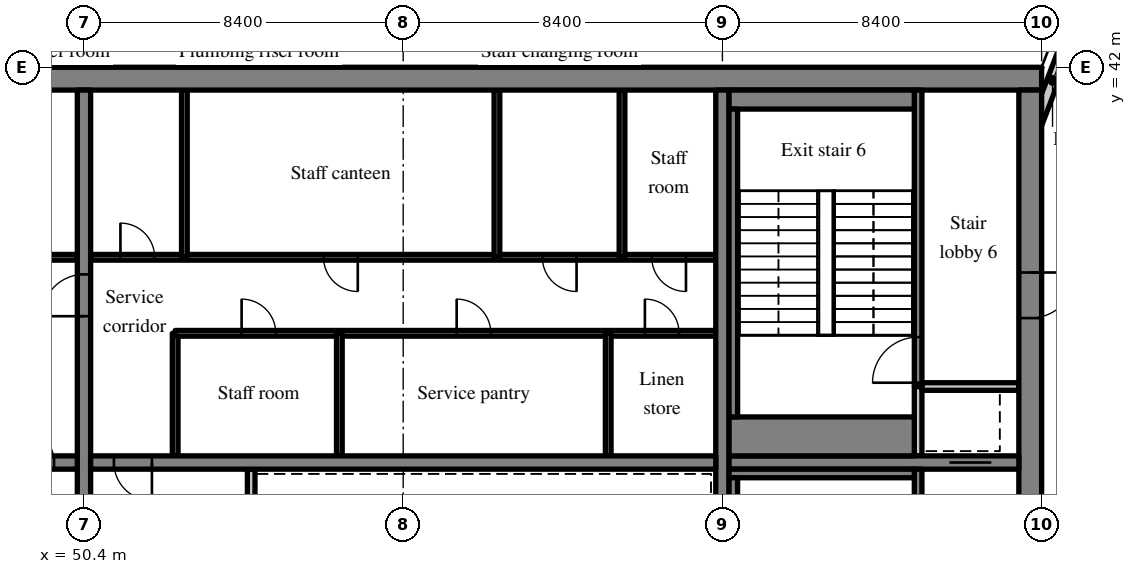
"""IFC4 building model, lengths in metres.
Left out: names, types, materials, properties, quantities, classifications, styles, units other than length and angle.
Written with IfcOpenShell. Run it as: python <this file> out.ifc"""

import sys

from ifc_helpers import new_model, si_unit, direction, frame, frame_2d, origin, place, context, subcontext, project, spatial, rectangle, extrude, source, transform, mapped, element, fill, save


model = new_model("IFC4")
c1 = context("Model", 3, precision=1e-05, world=origin(), true_north=direction((0.0, 1.0)))
c2 = subcontext(c1, "Body", "Model", "MODEL_VIEW")
j1 = project(units=[si_unit("LENGTHUNIT", "METRE"), si_unit("PLANEANGLEUNIT", "RADIAN")], contexts=[c1])
p1 = place(None, origin())
s1 = spatial("IfcSite", under=j1, at=p1, CompositionType="ELEMENT")
p2 = place(p1, origin())
s2 = spatial("IfcBuilding", under=s1, at=p2, CompositionType="ELEMENT")
p3 = place(p2, frame((0.0, 0.0, 214.0)))
s3 = spatial("IfcBuildingStorey", under=s2, at=p3, CompositionType="ELEMENT", Elevation=214.0)
m1 = source(origin(), c2, "Body", "SweptSolid", [
    extrude(rectangle(XDim=50.4, YDim=0.6, at=frame_2d((25.2, 0.0))), origin(), (0.0, 0.0, 1.0), 3.62),
])
p4 = place(p3, frame((25.2, 41.7, 0.0), z_axis=(0.0, 0.0, 1.0), x_axis=(1.0, 0.0, 0.0)))
e1 = element("IfcWall", 1, at=p4, inside=s3, PredefinedType="SHEAR", context=c2, shape_type="MappedRepresentation", body=[
    mapped(m1, transform((0.0, 0.0, 0.0), scale=1.0)),
])
m2 = source(origin(), c2, "Body", "SweptSolid", [
    extrude(rectangle(XDim=18.8, YDim=0.6, at=frame_2d((9.4, 0.0))), origin(), (0.0, 0.0, 1.0), 3.62),
])
p5 = place(p3, frame((75.3, 22.6, 0.0), z_axis=(0.0, 0.0, 1.0), x_axis=(0.0, 1.0, 0.0)))
e2 = element("IfcWall", 2, at=p5, inside=s3, PredefinedType="SHEAR", context=c2, shape_type="MappedRepresentation", body=[
    mapped(m2, transform((0.0, 0.0, 0.0), scale=1.0)),
])
m3 = source(origin(), c2, "Body", "SweptSolid", [
    extrude(rectangle(XDim=1.2, YDim=2.1, at=frame_2d((0.6, 1.05))), frame((0.0, 0.31, 0.0), z_axis=(0.0, -1.0, 0.0), x_axis=(1.0, 0.0, 0.0)), (0.0, 0.0, 1.0), 0.62),
])
p6 = place(p5, frame((12.8, 0.0, 0.0)))
e3 = element("IfcOpeningElement", 3, at=p6, cuts=e2, PredefinedType="OPENING", context=c2, shape_type="MappedRepresentation", body=[
    mapped(m3, transform((0.0, 0.0, 0.0), scale=1.0)),
])
m4 = source(origin(), c2, "Body", "SweptSolid", [
    extrude(rectangle(XDim=18.8, YDim=0.35, at=frame_2d((9.4, 0.0))), origin(), (0.0, 0.0, 1.0), 3.62),
])
p7 = place(p3, frame((50.4, 22.6, 0.0), z_axis=(0.0, 0.0, 1.0), x_axis=(0.0, 1.0, 0.0)))
e4 = element("IfcWall", 4, at=p7, inside=s3, PredefinedType="SHEAR", context=c2, shape_type="MappedRepresentation", body=[
    mapped(m4, transform((0.0, 0.0, 0.0), scale=1.0)),
])
m5 = source(origin(), c2, "Body", "SweptSolid", [
    extrude(rectangle(XDim=1.1, YDim=2.1, at=frame_2d((0.55, 1.05))), frame((0.0, 0.185, 0.0), z_axis=(0.0, -1.0, 0.0), x_axis=(1.0, 0.0, 0.0)), (0.0, 0.0, 1.0), 0.37),
])
p8 = place(p7, frame((12.85, 0.0, 0.0)))
e5 = element("IfcOpeningElement", 5, at=p8, cuts=e4, PredefinedType="OPENING", context=c2, shape_type="MappedRepresentation", body=[
    mapped(m5, transform((0.0, 0.0, 0.0), scale=1.0)),
])
p9 = place(p3, frame((67.2, 22.6, 0.0), z_axis=(0.0, 0.0, 1.0), x_axis=(0.0, 1.0, 0.0)))
e6 = element("IfcWall", 6, at=p9, inside=s3, PredefinedType="SHEAR", context=c2, shape_type="MappedRepresentation", body=[
    mapped(m4, transform((0.0, 0.0, 0.0), scale=1.0)),
])
m6 = source(origin(), c2, "Body", "SweptSolid", [
    extrude(rectangle(XDim=16.45, YDim=0.35, at=frame_2d((8.225, 0.0))), origin(), (0.0, 0.0, 1.0), 3.62),
])
p10 = place(p3, frame((33.775, 31.6, 0.0), z_axis=(0.0, 0.0, 1.0), x_axis=(1.0, 0.0, 0.0)))
e7 = element("IfcWall", 7, at=p10, inside=s3, PredefinedType="SHEAR", context=c2, shape_type="MappedRepresentation", body=[
    mapped(m6, transform((0.0, 0.0, 0.0), scale=1.0)),
])
m7 = source(origin(), c2, "Body", "SweptSolid", [
    extrude(rectangle(XDim=1.0, YDim=2.1, at=frame_2d((0.5, 1.05))), frame((0.0, 0.185, 0.0), z_axis=(0.0, -1.0, 0.0), x_axis=(1.0, 0.0, 0.0)), (0.0, 0.0, 1.0), 0.37),
])
p11 = place(p10, frame((14.837, 0.0, 0.0)))
e8 = element("IfcOpeningElement", 8, at=p11, cuts=e7, PredefinedType="OPENING", context=c2, shape_type="MappedRepresentation", body=[
    mapped(m7, transform((0.0, 0.0, 0.0), scale=1.0)),
])
m8 = source(origin(), c2, "Body", "SweptSolid", [
    extrude(rectangle(XDim=16.45, YDim=0.35, at=frame_2d((8.225, 0.0))), origin(), (0.0, 0.0, 1.0), 3.62),
])
p12 = place(p3, frame((50.575, 31.6, 0.0), z_axis=(0.0, 0.0, 1.0), x_axis=(1.0, 0.0, 0.0)))
e9 = element("IfcWall", 9, at=p12, inside=s3, PredefinedType="SHEAR", context=c2, shape_type="MappedRepresentation", body=[
    mapped(m8, transform((0.0, 0.0, 0.0), scale=1.0)),
])
p13 = place(p12, frame((0.613, 0.0, 0.0)))
e10 = element("IfcOpeningElement", 10, at=p13, cuts=e9, PredefinedType="OPENING", context=c2, shape_type="MappedRepresentation", body=[
    mapped(m7, transform((0.0, 0.0, 0.0), scale=1.0)),
])
m9 = source(origin(), c2, "Body", "SweptSolid", [
    extrude(rectangle(XDim=7.625, YDim=0.35, at=frame_2d((3.812, 0.0))), origin(), (0.0, 0.0, 1.0), 3.62),
])
p14 = place(p3, frame((67.375, 31.6, 0.0), z_axis=(0.0, 0.0, 1.0), x_axis=(1.0, 0.0, 0.0)))
e11 = element("IfcWall", 11, at=p14, inside=s3, PredefinedType="SHEAR", context=c2, shape_type="MappedRepresentation", body=[
    mapped(m9, transform((0.0, 0.0, 0.0), scale=1.0)),
])
p15 = place(p14, frame((5.8, 0.0, 0.0)))
e12 = element("IfcOpeningElement", 12, at=p15, cuts=e11, PredefinedType="OPENING", context=c2, shape_type="MappedRepresentation", body=[
    mapped(m5, transform((0.0, 0.0, 0.0), scale=1.0)),
])
m10 = source(origin(), c2, "Body", "SweptSolid", [
    extrude(rectangle(XDim=3.559, YDim=0.3, at=frame_2d((1.78, 0.0))), origin(), (0.0, 0.0, 1.0), 3.62),
])
p16 = place(p3, frame((76.523, 43.292, 0.0), z_axis=(0.0, 0.0, 1.0), x_axis=(-0.35779745313, -0.933799219604, 0.0)))
e13 = element("IfcWall", 13, at=p16, inside=s3, PredefinedType="SOLIDWALL", context=c2, shape_type="MappedRepresentation", body=[
    mapped(m10, transform((0.0, 0.0, 0.0), scale=1.0)),
])
m11 = source(origin(), c2, "Body", "SweptSolid", [
    extrude(rectangle(XDim=1.5, YDim=2.0, at=frame_2d((0.75, 1.0))), frame((0.0, 0.16, 0.0), z_axis=(0.0, -1.0, 0.0), x_axis=(1.0, 0.0, 0.0)), (0.0, 0.0, 1.0), 0.32),
])
p17 = place(p16, frame((0.156, 0.0, 0.9)))
e14 = element("IfcOpeningElement", 14, at=p17, cuts=e13, PredefinedType="OPENING", context=c2, shape_type="MappedRepresentation", body=[
    mapped(m11, transform((0.0, 0.0, 0.0), scale=1.0)),
])
m12 = source(origin(), c2, "Body", "SweptSolid", [
    extrude(rectangle(XDim=16.45, YDim=0.15, at=frame_2d((8.225, 0.0))), origin(), (0.0, 0.0, 1.0), 3.62),
])
p18 = place(p3, frame((33.775, 37.0, 0.0), z_axis=(0.0, 0.0, 1.0), x_axis=(1.0, 0.0, 0.0)))
e15 = element("IfcWall", 15, at=p18, inside=s3, PredefinedType="PARTITIONING", context=c2, shape_type="MappedRepresentation", body=[
    mapped(m12, transform((0.0, 0.0, 0.0), scale=1.0)),
])
m13 = source(origin(), c2, "Body", "SweptSolid", [
    extrude(rectangle(XDim=0.9, YDim=2.1, at=frame_2d((0.45, 1.05))), frame((0.0, 0.085, 0.0), z_axis=(0.0, -1.0, 0.0), x_axis=(1.0, 0.0, 0.0)), (0.0, 0.0, 1.0), 0.17),
])
p19 = place(p18, frame((3.251, 0.0, 0.0)))
e16 = element("IfcOpeningElement", 16, at=p19, cuts=e15, PredefinedType="OPENING", context=c2, shape_type="MappedRepresentation", body=[
    mapped(m13, transform((0.0, 0.0, 0.0), scale=1.0)),
])
p20 = place(p18, frame((8.186, 0.0, 0.0)))
e17 = element("IfcOpeningElement", 17, at=p20, cuts=e15, PredefinedType="OPENING", context=c2, shape_type="MappedRepresentation", body=[
    mapped(m13, transform((0.0, 0.0, 0.0), scale=1.0)),
])
p21 = place(p18, frame((11.476, 0.0, 0.0)))
e18 = element("IfcOpeningElement", 18, at=p21, cuts=e15, PredefinedType="OPENING", context=c2, shape_type="MappedRepresentation", body=[
    mapped(m13, transform((0.0, 0.0, 0.0), scale=1.0)),
])
p22 = place(p18, frame((14.766, 0.0, 0.0)))
e19 = element("IfcOpeningElement", 19, at=p22, cuts=e15, PredefinedType="OPENING", context=c2, shape_type="MappedRepresentation", body=[
    mapped(m13, transform((0.0, 0.0, 0.0), scale=1.0)),
])
m14 = source(origin(), c2, "Body", "SweptSolid", [
    extrude(rectangle(XDim=2.625, YDim=0.2, at=frame_2d((1.312, 0.0))), origin(), (0.0, 0.0, 1.0), 3.62),
])
p23 = place(p3, frame((54.8, 28.8, 0.0), z_axis=(0.0, 0.0, 1.0), x_axis=(0.0, 1.0, 0.0)))
e20 = element("IfcWall", 20, at=p23, inside=s3, PredefinedType="SOLIDWALL", context=c2, shape_type="MappedRepresentation", body=[
    mapped(m14, transform((0.0, 0.0, 0.0), scale=1.0)),
])
m15 = source(origin(), c2, "Body", "SweptSolid", [
    extrude(rectangle(XDim=3.225, YDim=0.15, at=frame_2d((1.613, 0.0))), origin(), (0.0, 0.0, 1.0), 3.62),
])
p24 = place(p3, frame((52.8, 31.775, 0.0), z_axis=(0.0, 0.0, 1.0), x_axis=(0.0, 1.0, 0.0)))
e21 = element("IfcWall", 21, at=p24, inside=s3, PredefinedType="PARTITIONING", context=c2, shape_type="MappedRepresentation", body=[
    mapped(m15, transform((0.0, 0.0, 0.0), scale=1.0)),
])
m16 = source(origin(), c2, "Body", "SweptSolid", [
    extrude(rectangle(XDim=14.225, YDim=0.15, at=frame_2d((7.112, 0.0))), origin(), (0.0, 0.0, 1.0), 3.62),
])
p25 = place(p3, frame((67.025, 35.0, 0.0), z_axis=(0.0, 0.0, 1.0), x_axis=(-1.0, 0.0, 0.0)))
e22 = element("IfcWall", 22, at=p25, inside=s3, PredefinedType="PARTITIONING", context=c2, shape_type="MappedRepresentation", body=[
    mapped(m16, transform((0.0, 0.0, 0.0), scale=1.0)),
])
p26 = place(p25, frame((0.965, 0.0, 0.0)))
e23 = element("IfcOpeningElement", 23, at=p26, cuts=e22, PredefinedType="OPENING", context=c2, shape_type="MappedRepresentation", body=[
    mapped(m13, transform((0.0, 0.0, 0.0), scale=1.0)),
])
p27 = place(p25, frame((5.918, 0.0, 0.0)))
e24 = element("IfcOpeningElement", 24, at=p27, cuts=e22, PredefinedType="OPENING", context=c2, shape_type="MappedRepresentation", body=[
    mapped(m13, transform((0.0, 0.0, 0.0), scale=1.0)),
])
p28 = place(p25, frame((11.577, 0.0, 0.0)))
e25 = element("IfcOpeningElement", 25, at=p28, cuts=e22, PredefinedType="OPENING", context=c2, shape_type="MappedRepresentation", body=[
    mapped(m13, transform((0.0, 0.0, 0.0), scale=1.0)),
])
m17 = source(origin(), c2, "Body", "SweptSolid", [
    extrude(rectangle(XDim=16.45, YDim=0.15, at=frame_2d((8.225, 0.0))), origin(), (0.0, 0.0, 1.0), 3.62),
])
p29 = place(p3, frame((67.025, 37.0, 0.0), z_axis=(0.0, 0.0, 1.0), x_axis=(-1.0, 0.0, 0.0)))
e26 = element("IfcWall", 26, at=p29, inside=s3, PredefinedType="PARTITIONING", context=c2, shape_type="MappedRepresentation", body=[
    mapped(m17, transform((0.0, 0.0, 0.0), scale=1.0)),
])
p30 = place(p29, frame((0.784, 0.0, 0.0)))
e27 = element("IfcOpeningElement", 27, at=p30, cuts=e26, PredefinedType="OPENING", context=c2, shape_type="MappedRepresentation", body=[
    mapped(m13, transform((0.0, 0.0, 0.0), scale=1.0)),
])
p31 = place(p29, frame((3.663, 0.0, 0.0)))
e28 = element("IfcOpeningElement", 28, at=p31, cuts=e26, PredefinedType="OPENING", context=c2, shape_type="MappedRepresentation", body=[
    mapped(m13, transform((0.0, 0.0, 0.0), scale=1.0)),
])
p32 = place(p29, frame((9.42, 0.0, 0.0)))
e29 = element("IfcOpeningElement", 29, at=p32, cuts=e26, PredefinedType="OPENING", context=c2, shape_type="MappedRepresentation", body=[
    mapped(m13, transform((0.0, 0.0, 0.0), scale=1.0)),
])
p33 = place(p29, frame((14.766, 0.0, 0.0)))
e30 = element("IfcOpeningElement", 30, at=p33, cuts=e26, PredefinedType="OPENING", context=c2, shape_type="MappedRepresentation", body=[
    mapped(m13, transform((0.0, 0.0, 0.0), scale=1.0)),
])
for number, where, z_axis, x_axis in (
    (31, (64.195, 31.775, 0.0), (0.0, 0.0, 1.0), (0.0, 1.0, 0.0)),
    (32, (57.12, 31.775, 0.0), (0.0, 0.0, 1.0), (0.0, 1.0, 0.0)),
):
    element("IfcWall", number, at=place(p3, frame(where, z_axis=z_axis, x_axis=x_axis)), inside=s3, PredefinedType="PARTITIONING", context=c2, shape_type="MappedRepresentation", body=[
        mapped(m15, transform((0.0, 0.0, 0.0), scale=1.0)),
    ])
m18 = source(origin(), c2, "Body", "SweptSolid", [
    extrude(rectangle(XDim=4.4, YDim=0.15, at=frame_2d((2.2, 0.0))), origin(), (0.0, 0.0, 1.0), 3.62),
])
for number, where, z_axis, x_axis in (
    (33, (64.558, 37.0, 0.0), (0.0, 0.0, 1.0), (0.0, 1.0, 0.0)),
    (34, (61.267, 37.0, 0.0), (0.0, 0.0, 1.0), (0.0, 1.0, 0.0)),
    (35, (53.042, 37.0, 0.0), (0.0, 0.0, 1.0), (0.0, 1.0, 0.0)),
):
    element("IfcWall", number, at=place(p3, frame(where, z_axis=z_axis, x_axis=x_axis)), inside=s3, PredefinedType="PARTITIONING", context=c2, shape_type="MappedRepresentation", body=[
        mapped(m18, transform((0.0, 0.0, 0.0), scale=1.0)),
    ])
m19 = source(origin(), c2, "Body", "SweptSolid", [
    extrude(rectangle(XDim=8.825, YDim=0.2, at=frame_2d((4.413, 0.0))), origin(), (0.0, 0.0, 1.0), 3.62),
])
p34 = place(p3, frame((72.35, 22.6, 0.0), z_axis=(0.0, 0.0, 1.0), x_axis=(0.0, 1.0, 0.0)))
e36 = element("IfcWall", 36, at=p34, inside=s3, PredefinedType="SOLIDWALL", context=c2, shape_type="MappedRepresentation", body=[
    mapped(m19, transform((0.0, 0.0, 0.0), scale=1.0)),
])
m20 = source(origin(), c2, "Body", "SweptSolid", [
    extrude(rectangle(XDim=1.2, YDim=2.1, at=frame_2d((0.6, 1.05))), frame((0.0, 0.11, 0.0), z_axis=(0.0, -1.0, 0.0), x_axis=(1.0, 0.0, 0.0)), (0.0, 0.0, 1.0), 0.22),
])
p35 = place(p34, frame((1.0, 0.0, 0.0)))
e37 = element("IfcOpeningElement", 37, at=p35, cuts=e36, PredefinedType="OPENING", context=c2, shape_type="MappedRepresentation", body=[
    mapped(m20, transform((0.0, 0.0, 0.0), scale=1.0)),
])
m21 = source(origin(), c2, "Body", "SweptSolid", [
    extrude(rectangle(XDim=1.825, YDim=0.2, at=frame_2d((0.913, 0.0))), origin(), (0.0, 0.0, 1.0), 3.62),
])
p36 = place(p3, frame((72.35, 31.775, 0.0), z_axis=(0.0, 0.0, 1.0), x_axis=(0.0, 1.0, 0.0)))
e38 = element("IfcWall", 38, at=p36, inside=s3, PredefinedType="SOLIDWALL", context=c2, shape_type="MappedRepresentation", body=[
    mapped(m21, transform((0.0, 0.0, 0.0), scale=1.0)),
])
m22 = source(origin(), c2, "Body", "SweptSolid", [
    extrude(rectangle(XDim=2.55, YDim=0.2, at=frame_2d((1.275, 0.0))), origin(), (0.0, 0.0, 1.0), 3.62),
])
p37 = place(p3, frame((72.45, 33.6, 0.0), z_axis=(0.0, 0.0, 1.0), x_axis=(1.0, 0.0, 0.0)))
e39 = element("IfcWall", 39, at=p37, inside=s3, PredefinedType="SOLIDWALL", context=c2, shape_type="MappedRepresentation", body=[
    mapped(m22, transform((0.0, 0.0, 0.0), scale=1.0)),
])
m23 = source(origin(), c2, "Body", "SweptSolid", [
    extrude(rectangle(XDim=7.8, YDim=0.2, at=frame_2d((3.9, 0.0))), origin(), (0.0, 0.0, 1.0), 3.62),
])
p38 = place(p3, frame((72.35, 33.6, 0.0), z_axis=(0.0, 0.0, 1.0), x_axis=(0.0, 1.0, 0.0)))
e40 = element("IfcWall", 40, at=p38, inside=s3, PredefinedType="SOLIDWALL", context=c2, shape_type="MappedRepresentation", body=[
    mapped(m23, transform((0.0, 0.0, 0.0), scale=1.0)),
])
p39 = place(p38, frame((0.1, 0.0, 0.0)))
e41 = element("IfcOpeningElement", 41, at=p39, cuts=e40, PredefinedType="OPENING", context=c2, shape_type="MappedRepresentation", body=[
    mapped(m20, transform((0.0, 0.0, 0.0), scale=1.0)),
])
m24 = source(origin(), c2, "Body", "SweptSolid", [
    extrude(rectangle(XDim=4.875, YDim=0.225, at=frame_2d((2.438, 0.0))), origin(), (0.0, 0.0, 1.0), 3.62),
])
p40 = place(p3, frame((67.375, 31.312, 0.0), z_axis=(0.0, 0.0, 1.0), x_axis=(1.0, 0.0, 0.0)))
e42 = element("IfcWall", 42, at=p40, inside=s3, PredefinedType="SOLIDWALL", context=c2, shape_type="MappedRepresentation", body=[
    mapped(m24, transform((0.0, 0.0, 0.0), scale=1.0)),
])
m25 = source(origin(), c2, "Body", "SweptSolid", [
    extrude(rectangle(XDim=8.1, YDim=0.225, at=frame_2d((4.05, 0.0))), origin(), (0.0, 0.0, 1.0), 3.62),
])
p41 = place(p3, frame((67.487, 23.1, 0.0), z_axis=(0.0, 0.0, 1.0), x_axis=(0.0, 1.0, 0.0)))
e43 = element("IfcWall", 43, at=p41, inside=s3, PredefinedType="SOLIDWALL", context=c2, shape_type="MappedRepresentation", body=[
    mapped(m25, transform((0.0, 0.0, 0.0), scale=1.0)),
])
m26 = source(origin(), c2, "Body", "SweptSolid", [
    extrude(rectangle(XDim=4.875, YDim=0.5, at=frame_2d((2.438, 0.0))), origin(), (0.0, 0.0, 1.0), 3.62),
])
p42 = place(p3, frame((67.375, 41.15, 0.0), z_axis=(0.0, 0.0, 1.0), x_axis=(1.0, 0.0, 0.0)))
e44 = element("IfcWall", 44, at=p42, inside=s3, PredefinedType="SOLIDWALL", context=c2, shape_type="MappedRepresentation", body=[
    mapped(m26, transform((0.0, 0.0, 0.0), scale=1.0)),
])
m27 = source(origin(), c2, "Body", "SweptSolid", [
    extrude(rectangle(XDim=4.875, YDim=1.025, at=frame_2d((2.438, 0.0))), origin(), (0.0, 0.0, 1.0), 3.62),
])
p43 = place(p3, frame((67.375, 32.287, 0.0), z_axis=(0.0, 0.0, 1.0), x_axis=(1.0, 0.0, 0.0)))
e45 = element("IfcWall", 45, at=p43, inside=s3, PredefinedType="SOLIDWALL", context=c2, shape_type="MappedRepresentation", body=[
    mapped(m27, transform((0.0, 0.0, 0.0), scale=1.0)),
])
p44 = place(p3, frame((67.487, 32.8, 0.0), z_axis=(0.0, 0.0, 1.0), x_axis=(0.0, 1.0, 0.0)))
e46 = element("IfcWall", 46, at=p44, inside=s3, PredefinedType="SOLIDWALL", context=c2, shape_type="MappedRepresentation", body=[
    mapped(m25, transform((0.0, 0.0, 0.0), scale=1.0)),
])
m28 = source(origin(), c2, "Body", "SweptSolid", [
    extrude(rectangle(XDim=1.5, YDim=2.0, at=frame_2d((0.75, 1.0))), frame((0.0, 0.03, 0.0), z_axis=(0.0, -1.0, 0.0), x_axis=(1.0, 0.0, 0.0)), (0.0, 0.0, 1.0), 0.06),
])
p45 = place(p17, origin())
e47 = element("IfcWindow", 47, at=p45, inside=s3, PartitioningType="SINGLE_PANEL", PredefinedType="WINDOW", context=c2, shape_type="MappedRepresentation", body=[
    mapped(m28, transform((0.0, 0.0, 0.0), scale=1.0)),
])
fill(e14, e47)
m29 = source(origin(), c2, "Body", "SweptSolid", [
    extrude(rectangle(XDim=1.0, YDim=2.1, at=frame_2d((0.5, 1.05))), frame((0.0, 0.025, 0.0), z_axis=(0.0, -1.0, 0.0), x_axis=(1.0, 0.0, 0.0)), (0.0, 0.0, 1.0), 0.05),
])
p46 = place(p11, origin())
e48 = element("IfcDoor", 48, at=p46, inside=s3, OperationType="SINGLE_SWING_LEFT", PredefinedType="DOOR", context=c2, shape_type="MappedRepresentation", body=[
    mapped(m29, transform((0.0, 0.0, 0.0), scale=1.0)),
])
fill(e8, e48)
p47 = place(p13, origin())
e49 = element("IfcDoor", 49, at=p47, inside=s3, OperationType="SINGLE_SWING_RIGHT", PredefinedType="DOOR", context=c2, shape_type="MappedRepresentation", body=[
    mapped(m29, transform((0.0, 0.0, 0.0), scale=1.0)),
])
fill(e10, e49)
m30 = source(origin(), c2, "Body", "SweptSolid", [
    extrude(rectangle(XDim=0.9, YDim=2.1, at=frame_2d((0.45, 1.05))), frame((0.0, 0.025, 0.0), z_axis=(0.0, -1.0, 0.0), x_axis=(1.0, 0.0, 0.0)), (0.0, 0.0, 1.0), 0.05),
])
p48 = place(p26, origin())
e50 = element("IfcDoor", 50, at=p48, inside=s3, OperationType="SINGLE_SWING_RIGHT", PredefinedType="DOOR", context=c2, shape_type="MappedRepresentation", body=[
    mapped(m30, transform((0.0, 0.0, 0.0), scale=1.0)),
])
fill(e23, e50)
p49 = place(p27, origin())
e51 = element("IfcDoor", 51, at=p49, inside=s3, OperationType="SINGLE_SWING_RIGHT", PredefinedType="DOOR", context=c2, shape_type="MappedRepresentation", body=[
    mapped(m30, transform((0.0, 0.0, 0.0), scale=1.0)),
])
fill(e24, e51)
p50 = place(p28, origin())
e52 = element("IfcDoor", 52, at=p50, inside=s3, OperationType="SINGLE_SWING_RIGHT", PredefinedType="DOOR", context=c2, shape_type="MappedRepresentation", body=[
    mapped(m30, transform((0.0, 0.0, 0.0), scale=1.0)),
])
fill(e25, e52)
p51 = place(p30, origin())
e53 = element("IfcDoor", 53, at=p51, inside=s3, OperationType="SINGLE_SWING_LEFT", PredefinedType="DOOR", context=c2, shape_type="MappedRepresentation", body=[
    mapped(m30, transform((0.0, 0.0, 0.0), scale=1.0)),
])
fill(e27, e53)
p52 = place(p31, origin())
e54 = element("IfcDoor", 54, at=p52, inside=s3, OperationType="SINGLE_SWING_LEFT", PredefinedType="DOOR", context=c2, shape_type="MappedRepresentation", body=[
    mapped(m30, transform((0.0, 0.0, 0.0), scale=1.0)),
])
fill(e28, e54)
p53 = place(p32, origin())
e55 = element("IfcDoor", 55, at=p53, inside=s3, OperationType="SINGLE_SWING_LEFT", PredefinedType="DOOR", context=c2, shape_type="MappedRepresentation", body=[
    mapped(m30, transform((0.0, 0.0, 0.0), scale=1.0)),
])
fill(e29, e55)
p54 = place(p33, origin())
e56 = element("IfcDoor", 56, at=p54, inside=s3, OperationType="SINGLE_SWING_RIGHT", PredefinedType="DOOR", context=c2, shape_type="MappedRepresentation", body=[
    mapped(m30, transform((0.0, 0.0, 0.0), scale=1.0)),
])
fill(e30, e56)
m31 = source(origin(), c2, "Body", "SweptSolid", [
    extrude(rectangle(XDim=1.1, YDim=2.1, at=frame_2d((0.55, 1.05))), frame((0.0, 0.025, 0.0), z_axis=(0.0, -1.0, 0.0), x_axis=(1.0, 0.0, 0.0)), (0.0, 0.0, 1.0), 0.05),
])
p55 = place(p15, origin())
e57 = element("IfcDoor", 57, at=p55, inside=s3, OperationType="SLIDING_TO_LEFT", PredefinedType="DOOR", context=c2, shape_type="MappedRepresentation", body=[
    mapped(m31, transform((0.0, 0.0, 0.0), scale=1.0)),
])
fill(e12, e57)
m32 = source(origin(), c2, "Body", "SweptSolid", [
    extrude(rectangle(XDim=1.2, YDim=2.1, at=frame_2d((0.6, 1.05))), frame((0.0, 0.025, 0.0), z_axis=(0.0, -1.0, 0.0), x_axis=(1.0, 0.0, 0.0)), (0.0, 0.0, 1.0), 0.05),
])
p56 = place(p39, origin())
e58 = element("IfcDoor", 58, at=p56, inside=s3, OperationType="SINGLE_SWING_LEFT", PredefinedType="DOOR", context=c2, shape_type="MappedRepresentation", body=[
    mapped(m32, transform((0.0, 0.0, 0.0), scale=1.0)),
])
fill(e41, e58)
p57 = place(p6, origin())
e59 = element("IfcDoor", 59, at=p57, inside=s3, OperationType="SINGLE_SWING_RIGHT", PredefinedType="DOOR", context=c2, shape_type="MappedRepresentation", body=[
    mapped(m32, transform((0.0, 0.0, 0.0), scale=1.0)),
])
fill(e3, e59)
p58 = place(p8, origin())
e60 = element("IfcDoor", 60, at=p58, inside=s3, OperationType="SINGLE_SWING_LEFT", PredefinedType="DOOR", context=c2, shape_type="MappedRepresentation", body=[
    mapped(m31, transform((0.0, 0.0, 0.0), scale=1.0)),
])
fill(e5, e60)
save(model, sys.argv[1])
